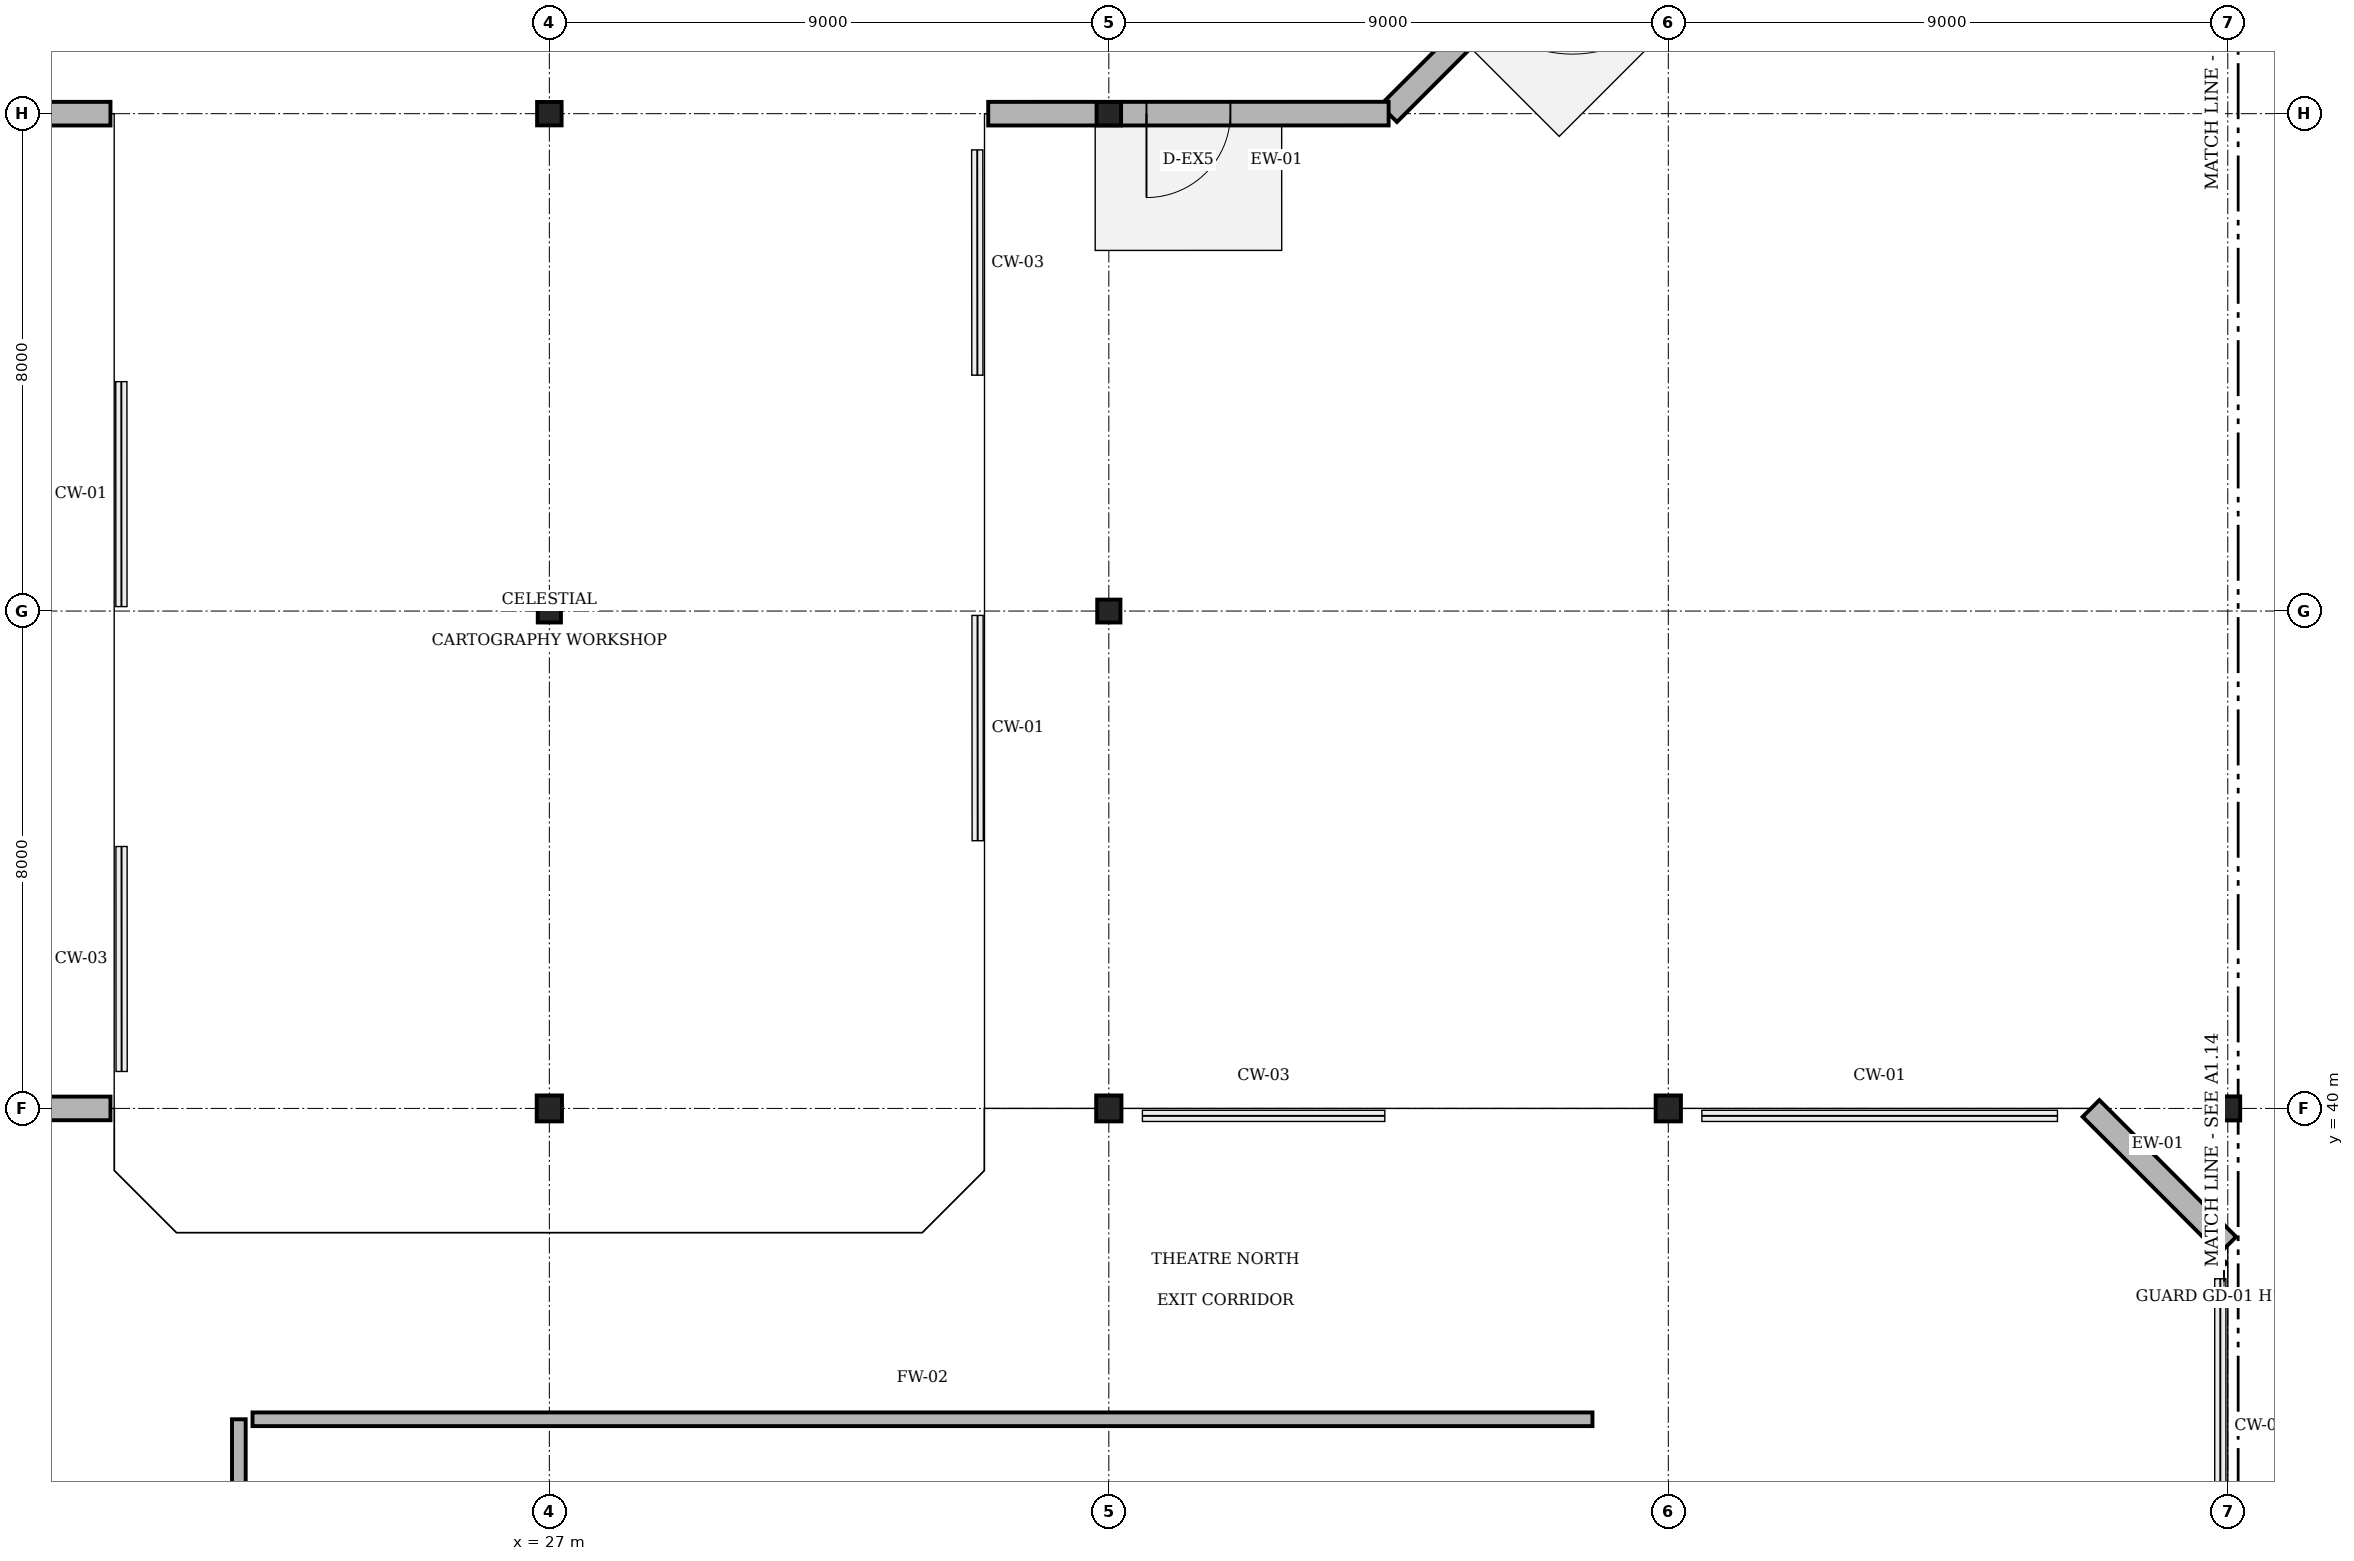
"""IFC4 building model, lengths in metres.
Left out: names, types, materials, properties, quantities, classifications, styles, units other than length and angle.
Written with IfcOpenShell. Run it as: python <this file> out.ifc"""

import sys

from ifc_helpers import new_model, si_unit, direction, frame, frame_2d, origin, origin_2d, place, context, subcontext, project, spatial, rectangle, i_section, extrude, element, fill, save


model = new_model("IFC4")
c1 = context("Model", 3, precision=1e-05, world=origin(), true_north=direction((0.0, 1.0)))
c2 = subcontext(c1, "Body", "Model", "MODEL_VIEW")
j1 = project(units=[si_unit("LENGTHUNIT", "METRE"), si_unit("PLANEANGLEUNIT", "RADIAN")], contexts=[c1])
p1 = place(None, origin())
s1 = spatial("IfcSite", under=j1, at=p1, CompositionType="ELEMENT")
p2 = place(p1, origin())
s2 = spatial("IfcBuilding", under=s1, at=p2, CompositionType="ELEMENT")
p3 = place(p2, origin())
s3 = spatial("IfcBuildingStorey", under=s2, at=p3, CompositionType="ELEMENT", Elevation=0.0)
for number, where, z_axis, x_axis in (
    (1, (27.0, 56.0, 0.0), (0.0, 0.0, 1.0), (1.0, 0.0, 0.0)),
    (2, (36.0, 56.0, 0.0), (0.0, 0.0, 1.0), (1.0, 0.0, 0.0)),
):
    element("IfcColumn", number, at=place(p3, frame(where, z_axis=z_axis, x_axis=x_axis)), inside=s3, PredefinedType="COLUMN", context=c2, shape_type="SweptSolid", body=[
        extrude(i_section(OverallWidth=0.394, OverallDepth=0.376, WebThickness=0.017, FlangeThickness=0.028, FilletRadius=0.015, at=origin_2d()), origin(), (0.0, 0.0, 1.0), 5.4),
    ])
for number, where, z_axis, x_axis in (
    (3, (27.0, 48.0, 0.0), (0.0, 0.0, 1.0), (1.0, 0.0, 0.0)),
    (4, (36.0, 48.0, 0.0), (0.0, 0.0, 1.0), (1.0, 0.0, 0.0)),
):
    element("IfcColumn", number, at=place(p3, frame(where, z_axis=z_axis, x_axis=x_axis)), inside=s3, PredefinedType="COLUMN", context=c2, shape_type="SweptSolid", body=[
        extrude(i_section(OverallWidth=0.373, OverallDepth=0.368, WebThickness=0.015, FlangeThickness=0.024, FilletRadius=0.015, at=origin_2d()), origin(), (0.0, 0.0, 1.0), 5.4),
    ])
for number, where, z_axis, x_axis in (
    (5, (27.0, 40.0, 0.0), (0.0, 0.0, 1.0), (1.0, 0.0, 0.0)),
    (6, (36.0, 40.0, 0.0), (0.0, 0.0, 1.0), (1.0, 0.0, 0.0)),
    (7, (45.0, 40.0, 0.0), (0.0, 0.0, 1.0), (1.0, 0.0, 0.0)),
):
    element("IfcColumn", number, at=place(p3, frame(where, z_axis=z_axis, x_axis=x_axis)), inside=s3, PredefinedType="COLUMN", context=c2, shape_type="SweptSolid", body=[
        extrude(i_section(OverallWidth=0.406, OverallDepth=0.417, WebThickness=0.03, FlangeThickness=0.044, FilletRadius=0.015, at=origin_2d()), origin(), (0.0, 0.0, 1.0), 5.4),
    ])
p4 = place(p3, frame((54.0, 40.0, 0.0), z_axis=(0.0, 0.0, 1.0), x_axis=(1.0, 0.0, 0.0)))
e8 = element("IfcColumn", 8, at=p4, inside=s3, PredefinedType="COLUMN", context=c2, shape_type="SweptSolid", body=[
    extrude(i_section(OverallWidth=0.399, OverallDepth=0.386, WebThickness=0.021, FlangeThickness=0.033, FilletRadius=0.015, at=origin_2d()), origin(), (0.0, 0.0, 1.0), 5.4),
])
p5 = place(p3, frame((11.2, 40.0, 0.0), z_axis=(0.0, 0.0, 1.0), x_axis=(1.0, 0.0, 0.0)))
e9 = element("IfcWall", 9, at=p5, inside=s3, PredefinedType="SOLIDWALL", context=c2, shape_type="SweptSolid", body=[
    extrude(rectangle(XDim=8.74, YDim=0.38, at=frame_2d((4.37, 0.0))), origin(), (0.0, 0.0, 1.0), 4.153),
])
p6 = place(p5, frame((3.47, 0.0, 0.0)))
e10 = element("IfcOpeningElement", 10, at=p6, cuts=e9, PredefinedType="OPENING", context=c2, shape_type="SweptSolid", body=[
    extrude(rectangle(XDim=1.8, YDim=2.4, at=frame_2d((0.9, 1.2))), frame((0.0, 0.2, 0.0), z_axis=(0.0, -1.0, 0.0), x_axis=(1.0, 0.0, 0.0)), (0.0, 0.0, 1.0), 0.4),
])
p7 = place(p3, frame((19.94, 56.0, 0.0), z_axis=(0.0, 0.0, 1.0), x_axis=(-1.0, 0.0, 0.0)))
e11 = element("IfcWall", 11, at=p7, inside=s3, PredefinedType="SOLIDWALL", context=c2, shape_type="SweptSolid", body=[
    extrude(rectangle(XDim=6.44, YDim=0.38, at=frame_2d((3.22, 0.0))), origin(), (0.0, 0.0, 1.0), 4.473),
])
p8 = place(p3, frame((45.0, 60.5, 0.0), z_axis=(0.0, 0.0, 1.0), x_axis=(-0.707106781187, -0.707106781187, 0.0)))
e12 = element("IfcWall", 12, at=p8, inside=s3, PredefinedType="SOLIDWALL", context=c2, shape_type="SweptSolid", body=[
    extrude(rectangle(XDim=6.363, YDim=0.38, at=frame_2d((3.181, 0.0))), origin(), (0.0, 0.0, 1.0), 4.7),
])
p9 = place(p8, frame((2.181, 0.0, 0.0)))
e13 = element("IfcOpeningElement", 13, at=p9, cuts=e12, PredefinedType="OPENING", context=c2, shape_type="SweptSolid", body=[
    extrude(rectangle(XDim=2.0, YDim=2.4, at=frame_2d((1.0, 1.2))), frame((0.0, 0.2, 0.0), z_axis=(0.0, -1.0, 0.0), x_axis=(1.0, 0.0, 0.0)), (0.0, 0.0, 1.0), 0.4),
])
p10 = place(p3, frame((40.501, 56.001, 0.0), z_axis=(0.0, 0.0, 1.0), x_axis=(-0.999999988506, -0.000151618526, 0.0)))
e14 = element("IfcWall", 14, at=p10, inside=s3, PredefinedType="SOLIDWALL", context=c2, shape_type="SweptSolid", body=[
    extrude(rectangle(XDim=6.441, YDim=0.38, at=frame_2d((3.22, 0.0))), origin(), (0.0, 0.0, 1.0), 4.483),
])
p11 = place(p10, frame((2.545, 0.0, 0.0)))
e15 = element("IfcOpeningElement", 15, at=p11, cuts=e14, PredefinedType="OPENING", context=c2, shape_type="SweptSolid", body=[
    extrude(rectangle(XDim=1.35, YDim=2.2, at=frame_2d((0.675, 1.1))), frame((0.0, 0.2, 0.0), z_axis=(0.0, -1.0, 0.0), x_axis=(1.0, 0.0, 0.0)), (0.0, 0.0, 1.0), 0.4),
])
p12 = place(p3, frame((51.8, 40.0, 0.0), z_axis=(0.0, 0.0, 1.0), x_axis=(0.707106781187, -0.707106781187, 0.0)))
e16 = element("IfcWall", 16, at=p12, inside=s3, PredefinedType="SOLIDWALL", context=c2, shape_type="SweptSolid", body=[
    extrude(rectangle(XDim=3.111, YDim=0.38, at=frame_2d((1.556, 0.0))), origin(), (0.0, 0.0, 1.0), 4.458),
])
p13 = place(p3, frame((22.005, 13.22, 0.0), z_axis=(0.0, 0.0, 1.0), x_axis=(0.0, 1.0, 0.0)))
e17 = element("IfcWall", 17, at=p13, inside=s3, PredefinedType="SOLIDWALL", context=c2, shape_type="SweptSolid", body=[
    extrude(rectangle(XDim=21.78, YDim=0.22, at=frame_2d((10.89, 0.0))), origin(), (0.0, 0.0, 1.0), 3.15),
])
p14 = place(p3, frame((22.225, 35.0, 0.0), z_axis=(0.0, 0.0, 1.0), x_axis=(1.0, 0.0, 0.0)))
e18 = element("IfcWall", 18, at=p14, inside=s3, PredefinedType="SOLIDWALL", context=c2, shape_type="SweptSolid", body=[
    extrude(rectangle(XDim=21.555, YDim=0.22, at=frame_2d((10.777, 0.0))), origin(), (0.0, 0.0, 1.0), 3.15),
])
p15 = place(p11, origin())
e19 = element("IfcDoor", 19, at=p15, inside=s3, OperationType="SINGLE_SWING_RIGHT", PredefinedType="DOOR", context=c2, shape_type="SweptSolid", body=[
    extrude(rectangle(XDim=1.35, YDim=2.2, at=frame_2d((0.675, 1.1))), frame((0.0, 0.025, 0.0), z_axis=(0.0, -1.0, 0.0), x_axis=(1.0, 0.0, 0.0)), (0.0, 0.0, 1.0), 0.05),
])
fill(e15, e19)
save(model, sys.argv[1])
